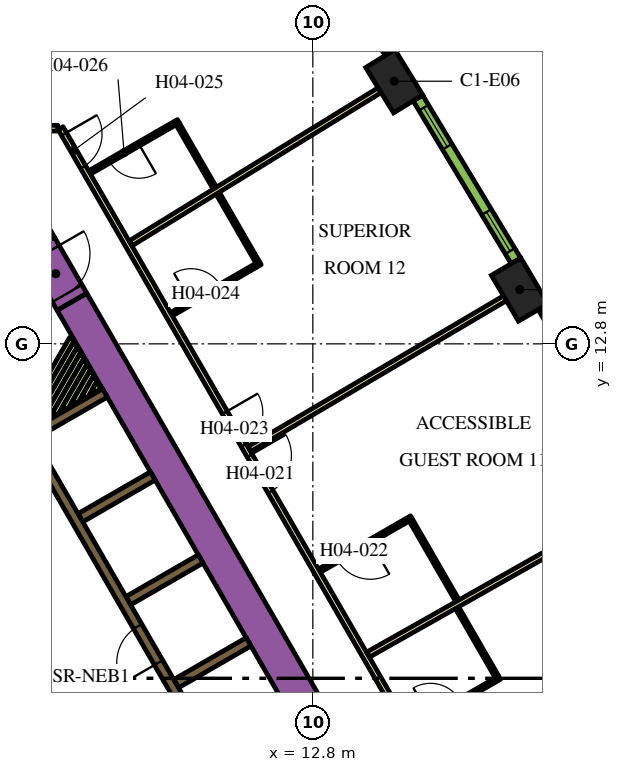
"""IFC4 building model, lengths in metres.
Left out: names, types, materials, properties, quantities, classifications, styles, units other than length and angle.
Written with IfcOpenShell. Run it as: python <this file> out.ifc"""

import sys

from ifc_helpers import new_model, si_unit, direction, frame, frame_2d, origin, origin_2d, place, context, subcontext, project, spatial, rectangle, extrude, element, fill, save


model = new_model("IFC4")
c1 = context("Model", 3, precision=1e-05, world=origin(), true_north=direction((0.0, 1.0)))
c2 = subcontext(c1, "Body", "Model", "MODEL_VIEW")
j1 = project(units=[si_unit("LENGTHUNIT", "METRE"), si_unit("PLANEANGLEUNIT", "RADIAN")], contexts=[c1])
p1 = place(None, origin())
s1 = spatial("IfcSite", under=j1, at=p1, CompositionType="ELEMENT")
p2 = place(p1, origin())
s2 = spatial("IfcBuilding", under=s1, at=p2, CompositionType="ELEMENT")
p3 = place(p2, frame((0.0, 0.0, 70.5)))
s3 = spatial("IfcBuildingStorey", under=s2, at=p3, CompositionType="ELEMENT", Elevation=70.5)
for number, where, z_axis, x_axis in (
    (1, (18.243, 14.228, 0.0), (0.0, 0.0, 1.0), (-0.508, 0.861, 0.0)),
    (2, (14.942, 19.71, 0.0), (0.0, 0.0, 1.0), (-0.524, 0.852, 0.0)),
):
    element("IfcColumn", number, at=place(p3, frame(where, z_axis=z_axis, x_axis=x_axis)), inside=s3, PredefinedType="COLUMN", context=c2, shape_type="SweptSolid", body=[
        extrude(rectangle(XDim=1.4, YDim=0.9, at=origin_2d()), origin(), (0.0, 0.0, 1.0), 3.9),
    ])
p4 = place(p3, frame((6.461, 13.909, 0.0), z_axis=(0.0, 0.0, 1.0), x_axis=(0.500005804227, -0.866022052686, 0.0)))
e3 = element("IfcWall", 3, at=p4, inside=s3, PredefinedType="SOLIDWALL", context=c2, shape_type="SweptSolid", body=[
    extrude(rectangle(XDim=20.834, YDim=0.9, at=frame_2d((10.417, 0.0))), origin(), (0.0, 0.0, 1.0), 3.9),
])
p5 = place(p3, frame((5.611, 15.382, 0.0), z_axis=(0.0, 0.0, 1.0), x_axis=(-0.500102178127, 0.865966403178, 0.0)))
e4 = element("IfcWall", 4, at=p5, inside=s3, PredefinedType="SOLIDWALL", context=c2, shape_type="SweptSolid", body=[
    extrude(rectangle(XDim=0.464, YDim=0.9, at=frame_2d((0.232, 0.0))), origin(), (0.0, 0.0, 1.0), 3.9),
])
for number, where, z_axis, x_axis in (
    (5, (9.204, 3.859, 0.0), (0.0, 0.0, 1.0), (0.866, 0.5, 0.0)),
    (6, (7.944, 6.041, 0.0), (0.0, 0.0, 1.0), (0.866, 0.5, 0.0)),
    (7, (6.684, 8.224, 0.0), (0.0, 0.0, 1.0), (0.866, 0.5, 0.0)),
):
    element("IfcWall", number, at=place(p3, frame(where, z_axis=z_axis, x_axis=x_axis)), inside=s3, PredefinedType="SOLIDWALL", context=c2, shape_type="SweptSolid", body=[
        extrude(rectangle(XDim=2.2, YDim=0.25, at=frame_2d((1.1, 0.0))), origin(), (0.0, 0.0, 1.0), 3.9),
    ])
p6 = place(p3, frame((4.776, 10.032, 0.0), z_axis=(0.0, 0.0, 1.0), x_axis=(0.86600215702, 0.500040262416, 0.0)))
e8 = element("IfcWall", 8, at=p6, inside=s3, PredefinedType="SOLIDWALL", context=c2, shape_type="SweptSolid", body=[
    extrude(rectangle(XDim=2.948, YDim=0.25, at=frame_2d((1.474, 0.0))), origin(), (0.0, 0.0, 1.0), 3.9),
])
p7 = place(p3, frame((5.97, -2.591, 0.0), z_axis=(0.0, 0.0, 1.0), x_axis=(-0.499994469932, 0.866028596547, 0.0)))
e9 = element("IfcWall", 9, at=p7, inside=s3, PredefinedType="SOLIDWALL", context=c2, shape_type="SweptSolid", body=[
    extrude(rectangle(XDim=10.488, YDim=0.25, at=frame_2d((5.244, 0.0))), origin(), (0.0, 0.0, 1.0), 3.9),
])
p8 = place(p3, frame((4.982, 10.359, 0.0), z_axis=(0.0, 0.0, 1.0), x_axis=(0.500051824031, 0.865995481099, 0.0)))
e10 = element("IfcWall", 10, at=p8, inside=s3, PredefinedType="PARTITIONING", context=c2, shape_type="SweptSolid", body=[
    extrude(rectangle(XDim=2.973, YDim=0.15, at=frame_2d((1.486, 0.0))), origin(), (0.0, 0.0, 1.0), 2.75),
])
p9 = place(p3, frame((5.242, 10.509, 0.0), z_axis=(0.0, 0.0, 1.0), x_axis=(0.499958506883, 0.866049358521, 0.0)))
e11 = element("IfcWall", 11, at=p9, inside=s3, PredefinedType="PARTITIONING", context=c2, shape_type="SweptSolid", body=[
    extrude(rectangle(XDim=2.626, YDim=0.15, at=frame_2d((1.313, 0.0))), origin(), (0.0, 0.0, 1.0), 2.75),
])
p10 = place(p3, frame((5.501, 10.659, 0.0), z_axis=(0.0, 0.0, 1.0), x_axis=(0.499951092774, 0.866053638543, 0.0)))
e12 = element("IfcWall", 12, at=p10, inside=s3, PredefinedType="PARTITIONING", context=c2, shape_type="SweptSolid", body=[
    extrude(rectangle(XDim=2.28, YDim=0.15, at=frame_2d((1.14, 0.0))), origin(), (0.0, 0.0, 1.0), 2.75),
])
p11 = place(p3, frame((5.761, 10.809, 0.0), z_axis=(0.0, 0.0, 1.0), x_axis=(0.499900985997, 0.866082561999, 0.0)))
e13 = element("IfcWall", 13, at=p11, inside=s3, PredefinedType="PARTITIONING", context=c2, shape_type="SweptSolid", body=[
    extrude(rectangle(XDim=1.934, YDim=0.15, at=frame_2d((0.967, 0.0))), origin(), (0.0, 0.0, 1.0), 2.75),
])
p12 = place(p3, frame((6.021, 10.959, 0.0), z_axis=(0.0, 0.0, 1.0), x_axis=(0.499944387978, 0.86605750902, 0.0)))
e14 = element("IfcWall", 14, at=p12, inside=s3, PredefinedType="PARTITIONING", context=c2, shape_type="SweptSolid", body=[
    extrude(rectangle(XDim=1.587, YDim=0.15, at=frame_2d((0.793, 0.0))), origin(), (0.0, 0.0, 1.0), 2.75),
])
p13 = place(p3, frame((6.281, 11.109, 0.0), z_axis=(0.0, 0.0, 1.0), x_axis=(0.500012022864, 0.866018462269, 0.0)))
e15 = element("IfcWall", 15, at=p13, inside=s3, PredefinedType="PARTITIONING", context=c2, shape_type="SweptSolid", body=[
    extrude(rectangle(XDim=1.241, YDim=0.15, at=frame_2d((0.62, 0.0))), origin(), (0.0, 0.0, 1.0), 2.75),
])
p14 = place(p3, frame((6.541, 11.259, 0.0), z_axis=(0.0, 0.0, 1.0), x_axis=(0.500132045864, 0.865949153646, 0.0)))
e16 = element("IfcWall", 16, at=p14, inside=s3, PredefinedType="PARTITIONING", context=c2, shape_type="SweptSolid", body=[
    extrude(rectangle(XDim=0.894, YDim=0.15, at=frame_2d((0.447, 0.0))), origin(), (0.0, 0.0, 1.0), 2.75),
])
p15 = place(p3, frame((6.8, 11.409, 0.0), z_axis=(0.0, 0.0, 1.0), x_axis=(0.500210807569, 0.865903659763, 0.0)))
e17 = element("IfcWall", 17, at=p15, inside=s3, PredefinedType="PARTITIONING", context=c2, shape_type="SweptSolid", body=[
    extrude(rectangle(XDim=0.548, YDim=0.15, at=frame_2d((0.274, 0.0))), origin(), (0.0, 0.0, 1.0), 2.75),
])
p16 = place(p3, frame((7.06, 11.559, 0.0), z_axis=(0.0, 0.0, 1.0), x_axis=(0.499267785915, 0.866447735266, 0.0)))
e18 = element("IfcWall", 18, at=p16, inside=s3, PredefinedType="PARTITIONING", context=c2, shape_type="SweptSolid", body=[
    extrude(rectangle(XDim=0.201, YDim=0.15, at=frame_2d((0.101, 0.0))), origin(), (0.0, 0.0, 1.0), 2.75),
])
p17 = place(p3, frame((11.553, -0.46, 0.0), z_axis=(0.0, 0.0, 1.0), x_axis=(-0.500006514828, 0.866021642414, 0.0)))
e19 = element("IfcWall", 19, at=p17, inside=s3, PredefinedType="SOLIDWALL", context=c2, shape_type="SweptSolid", body=[
    extrude(rectangle(XDim=12.35, YDim=0.25, at=frame_2d((6.175, 0.0))), origin(), (0.0, 0.0, 1.0), 3.9),
])
p18 = place(p17, frame((0.585, 0.0, 0.0)))
e20 = element("IfcOpeningElement", 20, at=p18, cuts=e19, PredefinedType="OPENING", context=c2, shape_type="SweptSolid", body=[
    extrude(rectangle(XDim=1.1, YDim=2.1, at=frame_2d((0.55, 1.05))), frame((0.0, 0.135, 0.0), z_axis=(0.0, -1.0, 0.0), x_axis=(1.0, 0.0, 0.0)), (0.0, 0.0, 1.0), 0.27),
])
p19 = place(p17, frame((3.105, 0.0, 0.0)))
e21 = element("IfcOpeningElement", 21, at=p19, cuts=e19, PredefinedType="OPENING", context=c2, shape_type="SweptSolid", body=[
    extrude(rectangle(XDim=1.1, YDim=2.1, at=frame_2d((0.55, 1.05))), frame((0.0, 0.135, 0.0), z_axis=(0.0, -1.0, 0.0), x_axis=(1.0, 0.0, 0.0)), (0.0, 0.0, 1.0), 0.27),
])
p20 = place(p17, frame((5.625, 0.0, 0.0)))
e22 = element("IfcOpeningElement", 22, at=p20, cuts=e19, PredefinedType="OPENING", context=c2, shape_type="SweptSolid", body=[
    extrude(rectangle(XDim=1.1, YDim=2.1, at=frame_2d((0.55, 1.05))), frame((0.0, 0.135, 0.0), z_axis=(0.0, -1.0, 0.0), x_axis=(1.0, 0.0, 0.0)), (0.0, 0.0, 1.0), 0.27),
])
p21 = place(p3, frame((8.565, -2.185, 0.0), z_axis=(0.0, 0.0, 1.0), x_axis=(-0.499997954832, 0.866026584559, 0.0)))
e23 = element("IfcWall", 23, at=p21, inside=s3, PredefinedType="SOLIDWALL", context=c2, shape_type="SweptSolid", body=[
    extrude(rectangle(XDim=12.35, YDim=0.25, at=frame_2d((6.175, 0.0))), origin(), (0.0, 0.0, 1.0), 3.9),
])
p22 = place(p21, frame((5.725, 0.0, 0.0)))
e24 = element("IfcOpeningElement", 24, at=p22, cuts=e23, PredefinedType="OPENING", context=c2, shape_type="SweptSolid", body=[
    extrude(rectangle(XDim=0.9, YDim=2.1, at=frame_2d((0.45, 1.05))), frame((0.0, 0.135, 0.0), z_axis=(0.0, -1.0, 0.0), x_axis=(1.0, 0.0, 0.0)), (0.0, 0.0, 1.0), 0.27),
])
p23 = place(p3, frame((5.611, 15.382, 0.0), z_axis=(0.0, 0.0, 1.0), x_axis=(0.500062241894, -0.865989465428, 0.0)))
e25 = element("IfcWall", 25, at=p23, inside=s3, PredefinedType="SOLIDWALL", context=c2, shape_type="SweptSolid", body=[
    extrude(rectangle(XDim=1.7, YDim=0.9, at=frame_2d((0.85, 0.0))), origin(), (0.0, 0.0, 1.0), 3.9),
])
p24 = place(p23, frame((0.25, 0.0, 0.0)))
e26 = element("IfcOpeningElement", 26, at=p24, cuts=e25, PredefinedType="OPENING", context=c2, shape_type="SweptSolid", body=[
    extrude(rectangle(XDim=1.2, YDim=2.1, at=frame_2d((0.6, 1.05))), frame((0.0, 0.46, 0.0), z_axis=(0.0, -1.0, 0.0), x_axis=(1.0, 0.0, 0.0)), (0.0, 0.0, 1.0), 0.92),
])
p25 = place(p3, frame((6.163, 18.475, 0.0), z_axis=(0.0, 0.0, 1.0), x_axis=(0.500001317485, -0.866024643133, 0.0)))
e27 = element("IfcWall", 27, at=p25, inside=s3, PredefinedType="PARTITIONING", context=c2, shape_type="SweptSolid", body=[
    extrude(rectangle(XDim=25.767, YDim=0.15, at=frame_2d((12.883, 0.0))), origin(), (0.0, 0.0, 1.0), 2.75),
])
p26 = place(p25, frame((21.138, 0.0, 0.0)))
e28 = element("IfcOpeningElement", 28, at=p26, cuts=e27, PredefinedType="OPENING", context=c2, shape_type="SweptSolid", body=[
    extrude(rectangle(XDim=1.0, YDim=2.1, at=frame_2d((0.5, 1.05))), frame((0.0, 0.085, 0.0), z_axis=(0.0, -1.0, 0.0), x_axis=(1.0, 0.0, 0.0)), (0.0, 0.0, 1.0), 0.17),
])
p27 = place(p25, frame((9.948, 0.0, 0.0)))
e29 = element("IfcOpeningElement", 29, at=p27, cuts=e27, PredefinedType="OPENING", context=c2, shape_type="SweptSolid", body=[
    extrude(rectangle(XDim=1.1, YDim=2.1, at=frame_2d((0.55, 1.05))), frame((0.0, 0.085, 0.0), z_axis=(0.0, -1.0, 0.0), x_axis=(1.0, 0.0, 0.0)), (0.0, 0.0, 1.0), 0.17),
])
p28 = place(p25, frame((8.641, 0.0, 0.0)))
e30 = element("IfcOpeningElement", 30, at=p28, cuts=e27, PredefinedType="OPENING", context=c2, shape_type="SweptSolid", body=[
    extrude(rectangle(XDim=1.0, YDim=2.1, at=frame_2d((0.5, 1.05))), frame((0.0, 0.085, 0.0), z_axis=(0.0, -1.0, 0.0), x_axis=(1.0, 0.0, 0.0)), (0.0, 0.0, 1.0), 0.17),
])
p29 = place(p25, frame((0.18, 0.0, 0.0)))
e31 = element("IfcOpeningElement", 31, at=p29, cuts=e27, PredefinedType="OPENING", context=c2, shape_type="SweptSolid", body=[
    extrude(rectangle(XDim=1.0, YDim=2.1, at=frame_2d((0.5, 1.05))), frame((0.0, 0.085, 0.0), z_axis=(0.0, -1.0, 0.0), x_axis=(1.0, 0.0, 0.0)), (0.0, 0.0, 1.0), 0.17),
])
p30 = place(p3, frame((0.825, 18.475, 0.0), z_axis=(0.0, 0.0, 1.0), x_axis=(1.0, 0.0, 0.0)))
e32 = element("IfcWall", 32, at=p30, inside=s3, PredefinedType="PARTITIONING", context=c2, shape_type="SweptSolid", body=[
    extrude(rectangle(XDim=5.268, YDim=0.15, at=frame_2d((2.634, 0.0))), origin(), (0.0, 0.0, 1.0), 2.75),
])
p31 = place(p3, frame((11.16, 24.888, 0.0), z_axis=(0.0, 0.0, 1.0), x_axis=(-0.84199813156, -0.539480441211, 0.0)))
e33 = element("IfcWall", 33, at=p31, inside=s3, PredefinedType="PARTITIONING", context=c2, shape_type="SweptSolid", body=[
    extrude(rectangle(XDim=11.638, YDim=0.15, at=frame_2d((5.819, 0.0))), origin(), (0.0, 0.0, 1.0), 2.75),
])
p32 = place(p3, frame((14.558, 19.475, 0.0), z_axis=(0.0, 0.0, 1.0), x_axis=(-0.851829455142, -0.523819223925, 0.0)))
e34 = element("IfcWall", 34, at=p32, inside=s3, PredefinedType="PARTITIONING", context=c2, shape_type="SweptSolid", body=[
    extrude(rectangle(XDim=7.688, YDim=0.15, at=frame_2d((3.844, 0.0))), origin(), (0.0, 0.0, 1.0), 2.75),
])
p33 = place(p3, frame((17.856, 13.999, 0.0), z_axis=(0.0, 0.0, 1.0), x_axis=(-0.861371519381, -0.507975497047, 0.0)))
e35 = element("IfcWall", 35, at=p33, inside=s3, PredefinedType="PARTITIONING", context=c2, shape_type="SweptSolid", body=[
    extrude(rectangle(XDim=7.804, YDim=0.15, at=frame_2d((3.902, 0.0))), origin(), (0.0, 0.0, 1.0), 2.75),
])
p34 = place(p3, frame((21.052, 8.464, 0.0), z_axis=(0.0, 0.0, 1.0), x_axis=(-0.87059371954, -0.492002617368, 0.0)))
e36 = element("IfcWall", 36, at=p34, inside=s3, PredefinedType="PARTITIONING", context=c2, shape_type="SweptSolid", body=[
    extrude(rectangle(XDim=7.803, YDim=0.15, at=frame_2d((3.902, 0.0))), origin(), (0.0, 0.0, 1.0), 2.75),
])
p35 = place(p3, frame((15.376, 2.668, 0.0), z_axis=(0.0, 0.0, 1.0), x_axis=(0.866036505625, 0.499980770555, 0.0)))
e37 = element("IfcWall", 37, at=p35, inside=s3, PredefinedType="PARTITIONING", context=c2, shape_type="SweptSolid", body=[
    extrude(rectangle(XDim=2.7, YDim=0.1, at=frame_2d((1.35, 0.0))), origin(), (0.0, 0.0, 1.0), 2.75),
])
p36 = place(p35, frame((0.6, 0.0, 0.0)))
e38 = element("IfcOpeningElement", 38, at=p36, cuts=e37, PredefinedType="OPENING", context=c2, shape_type="SweptSolid", body=[
    extrude(rectangle(XDim=0.9, YDim=2.1, at=frame_2d((0.45, 1.05))), frame((0.0, 0.06, 0.0), z_axis=(0.0, -1.0, 0.0), x_axis=(1.0, 0.0, 0.0)), (0.0, 0.0, 1.0), 0.12),
])
p37 = place(p3, frame((17.646, 4.036, 0.0), z_axis=(0.0, 0.0, 1.0), x_axis=(-0.500027713859, 0.866009402589, 0.0)))
e39 = element("IfcWall", 39, at=p37, inside=s3, PredefinedType="PARTITIONING", context=c2, shape_type="SweptSolid", body=[
    extrude(rectangle(XDim=2.1, YDim=0.1, at=frame_2d((1.05, 0.0))), origin(), (0.0, 0.0, 1.0), 2.75),
])
p38 = place(p3, frame((15.397, 8.231, 0.0), z_axis=(0.0, 0.0, 1.0), x_axis=(-0.866018616679, -0.500011755427, 0.0)))
e40 = element("IfcWall", 40, at=p38, inside=s3, PredefinedType="PARTITIONING", context=c2, shape_type="SweptSolid", body=[
    extrude(rectangle(XDim=2.8, YDim=0.1, at=frame_2d((1.4, 0.0))), origin(), (0.0, 0.0, 1.0), 2.75),
])
p39 = place(p38, frame((1.25, 0.0, 0.0)))
e41 = element("IfcOpeningElement", 41, at=p39, cuts=e40, PredefinedType="OPENING", context=c2, shape_type="SweptSolid", body=[
    extrude(rectangle(XDim=1.0, YDim=2.1, at=frame_2d((0.5, 1.05))), frame((0.0, 0.06, 0.0), z_axis=(0.0, -1.0, 0.0), x_axis=(1.0, 0.0, 0.0)), (0.0, 0.0, 1.0), 0.12),
])
p40 = place(p3, frame((15.379, 8.163, 0.0), z_axis=(0.0, 0.0, 1.0), x_axis=(0.499987006516, -0.866032905446, 0.0)))
e42 = element("IfcWall", 42, at=p40, inside=s3, PredefinedType="PARTITIONING", context=c2, shape_type="SweptSolid", body=[
    extrude(rectangle(XDim=2.45, YDim=0.1, at=frame_2d((1.225, 0.0))), origin(), (0.0, 0.0, 1.0), 2.75),
])
p41 = place(p3, frame((9.077, 13.578, 0.0), z_axis=(0.0, 0.0, 1.0), x_axis=(0.866036505625, 0.499980770555, 0.0)))
e43 = element("IfcWall", 43, at=p41, inside=s3, PredefinedType="PARTITIONING", context=c2, shape_type="SweptSolid", body=[
    extrude(rectangle(XDim=2.7, YDim=0.1, at=frame_2d((1.35, 0.0))), origin(), (0.0, 0.0, 1.0), 2.75),
])
p42 = place(p41, frame((0.6, 0.0, 0.0)))
e44 = element("IfcOpeningElement", 44, at=p42, cuts=e43, PredefinedType="OPENING", context=c2, shape_type="SweptSolid", body=[
    extrude(rectangle(XDim=0.9, YDim=2.1, at=frame_2d((0.45, 1.05))), frame((0.0, 0.06, 0.0), z_axis=(0.0, -1.0, 0.0), x_axis=(1.0, 0.0, 0.0)), (0.0, 0.0, 1.0), 0.12),
])
p43 = place(p3, frame((11.342, 14.955, 0.0), z_axis=(0.0, 0.0, 1.0), x_axis=(-0.500008976872, 0.866020220923, 0.0)))
e45 = element("IfcWall", 45, at=p43, inside=s3, PredefinedType="PARTITIONING", context=c2, shape_type="SweptSolid", body=[
    extrude(rectangle(XDim=2.09, YDim=0.1, at=frame_2d((1.045, 0.0))), origin(), (0.0, 0.0, 1.0), 2.75),
])
p44 = place(p3, frame((9.262, 18.658, 0.0), z_axis=(0.0, 0.0, 1.0), x_axis=(-0.866019956843, -0.50000943426, 0.0)))
e46 = element("IfcWall", 46, at=p44, inside=s3, PredefinedType="PARTITIONING", context=c2, shape_type="SweptSolid", body=[
    extrude(rectangle(XDim=2.7, YDim=0.1, at=frame_2d((1.35, 0.0))), origin(), (0.0, 0.0, 1.0), 2.75),
])
p45 = place(p44, frame((1.2, 0.0, 0.0)))
e47 = element("IfcOpeningElement", 47, at=p45, cuts=e46, PredefinedType="OPENING", context=c2, shape_type="SweptSolid", body=[
    extrude(rectangle(XDim=0.9, YDim=2.1, at=frame_2d((0.45, 1.05))), frame((0.0, 0.06, 0.0), z_axis=(0.0, -1.0, 0.0), x_axis=(1.0, 0.0, 0.0)), (0.0, 0.0, 1.0), 0.12),
])
p46 = place(p3, frame((9.244, 18.589, 0.0), z_axis=(0.0, 0.0, 1.0), x_axis=(0.500043961785, -0.866000020948, 0.0)))
e48 = element("IfcWall", 48, at=p46, inside=s3, PredefinedType="PARTITIONING", context=c2, shape_type="SweptSolid", body=[
    extrude(rectangle(XDim=1.95, YDim=0.1, at=frame_2d((0.975, 0.0))), origin(), (0.0, 0.0, 1.0), 2.75),
])
p47 = place(p3, frame((21.357, 9.445, 0.0), z_axis=(0.0, 0.0, 1.0), x_axis=(-0.50002123722, 0.866013142123, 0.0)))
e49 = element("IfcWall", 49, at=p47, inside=s3, PredefinedType="SOLIDWALL", context=c2, shape_type="SweptSolid", body=[
    extrude(rectangle(XDim=4.998, YDim=0.29, at=frame_2d((2.499, 0.0))), origin(), (0.0, 0.0, 1.0), 3.65),
])
p48 = place(p47, frame((0.297, 0.0, 0.9)))
e50 = element("IfcOpeningElement", 50, at=p48, cuts=e49, PredefinedType="OPENING", context=c2, shape_type="SweptSolid", body=[
    extrude(rectangle(XDim=1.2, YDim=2.15, at=frame_2d((0.6, 1.075))), frame((0.0, 0.155, 0.0), z_axis=(0.0, -1.0, 0.0), x_axis=(1.0, 0.0, 0.0)), (0.0, 0.0, 1.0), 0.31),
])
p49 = place(p47, frame((3.501, 0.0, 0.9)))
e51 = element("IfcOpeningElement", 51, at=p49, cuts=e49, PredefinedType="OPENING", context=c2, shape_type="SweptSolid", body=[
    extrude(rectangle(XDim=1.2, YDim=2.15, at=frame_2d((0.6, 1.075))), frame((0.0, 0.155, 0.0), z_axis=(0.0, -1.0, 0.0), x_axis=(1.0, 0.0, 0.0)), (0.0, 0.0, 1.0), 0.31),
])
p50 = place(p3, frame((18.143, 14.986, 0.0), z_axis=(0.0, 0.0, 1.0), x_axis=(-0.515938796285, 0.856625448191, 0.0)))
e52 = element("IfcWall", 52, at=p50, inside=s3, PredefinedType="SOLIDWALL", context=c2, shape_type="SweptSolid", body=[
    extrude(rectangle(XDim=4.998, YDim=0.29, at=frame_2d((2.499, 0.0))), origin(), (0.0, 0.0, 1.0), 3.65),
])
p51 = place(p50, frame((0.297, 0.0, 0.9)))
e53 = element("IfcOpeningElement", 53, at=p51, cuts=e52, PredefinedType="OPENING", context=c2, shape_type="SweptSolid", body=[
    extrude(rectangle(XDim=1.2, YDim=2.15, at=frame_2d((0.6, 1.075))), frame((0.0, 0.155, 0.0), z_axis=(0.0, -1.0, 0.0), x_axis=(1.0, 0.0, 0.0)), (0.0, 0.0, 1.0), 0.31),
])
p52 = place(p50, frame((3.501, 0.0, 0.9)))
e54 = element("IfcOpeningElement", 54, at=p52, cuts=e52, PredefinedType="OPENING", context=c2, shape_type="SweptSolid", body=[
    extrude(rectangle(XDim=1.2, YDim=2.15, at=frame_2d((0.6, 1.075))), frame((0.0, 0.155, 0.0), z_axis=(0.0, -1.0, 0.0), x_axis=(1.0, 0.0, 0.0)), (0.0, 0.0, 1.0), 0.31),
])
p53 = place(p3, frame((14.827, 20.466, 0.0), z_axis=(0.0, 0.0, 1.0), x_axis=(-0.531688286542, 0.846940119462, 0.0)))
e55 = element("IfcWall", 55, at=p53, inside=s3, PredefinedType="SOLIDWALL", context=c2, shape_type="SweptSolid", body=[
    extrude(rectangle(XDim=4.998, YDim=0.29, at=frame_2d((2.499, 0.0))), origin(), (0.0, 0.0, 1.0), 3.65),
])
p54 = place(p53, frame((0.297, 0.0, 0.9)))
e56 = element("IfcOpeningElement", 56, at=p54, cuts=e55, PredefinedType="OPENING", context=c2, shape_type="SweptSolid", body=[
    extrude(rectangle(XDim=1.2, YDim=2.15, at=frame_2d((0.6, 1.075))), frame((0.0, 0.155, 0.0), z_axis=(0.0, -1.0, 0.0), x_axis=(1.0, 0.0, 0.0)), (0.0, 0.0, 1.0), 0.31),
])
p55 = place(p53, frame((3.501, 0.0, 0.9)))
e57 = element("IfcOpeningElement", 57, at=p55, cuts=e55, PredefinedType="OPENING", context=c2, shape_type="SweptSolid", body=[
    extrude(rectangle(XDim=1.2, YDim=2.15, at=frame_2d((0.6, 1.075))), frame((0.0, 0.155, 0.0), z_axis=(0.0, -1.0, 0.0), x_axis=(1.0, 0.0, 0.0)), (0.0, 0.0, 1.0), 0.31),
])
p56 = place(p20, origin())
e58 = element("IfcDoor", 58, at=p56, inside=s3, OperationType="DOUBLE_DOOR_SLIDING", PredefinedType="DOOR", context=c2, shape_type="SweptSolid", body=[
    extrude(rectangle(XDim=1.1, YDim=2.1, at=frame_2d((0.55, 1.05))), frame((0.0, 0.025, 0.0), z_axis=(0.0, -1.0, 0.0), x_axis=(1.0, 0.0, 0.0)), (0.0, 0.0, 1.0), 0.05),
])
fill(e22, e58)
p57 = place(p24, origin())
e59 = element("IfcDoor", 59, at=p57, inside=s3, OperationType="SINGLE_SWING_LEFT", PredefinedType="DOOR", context=c2, shape_type="SweptSolid", body=[
    extrude(rectangle(XDim=1.2, YDim=2.1, at=frame_2d((0.6, 1.05))), frame((0.0, 0.025, 0.0), z_axis=(0.0, -1.0, 0.0), x_axis=(1.0, 0.0, 0.0)), (0.0, 0.0, 1.0), 0.05),
])
fill(e26, e59)
p58 = place(p27, origin())
e60 = element("IfcDoor", 60, at=p58, inside=s3, OperationType="SINGLE_SWING_LEFT", PredefinedType="DOOR", context=c2, shape_type="SweptSolid", body=[
    extrude(rectangle(XDim=1.1, YDim=2.1, at=frame_2d((0.55, 1.05))), frame((0.0, 0.025, 0.0), z_axis=(0.0, -1.0, 0.0), x_axis=(1.0, 0.0, 0.0)), (0.0, 0.0, 1.0), 0.05),
])
fill(e29, e60)
p59 = place(p39, origin())
e61 = element("IfcDoor", 61, at=p59, inside=s3, OperationType="SINGLE_SWING_LEFT", PredefinedType="DOOR", context=c2, shape_type="SweptSolid", body=[
    extrude(rectangle(XDim=1.0, YDim=2.1, at=frame_2d((0.5, 1.05))), frame((0.0, 0.025, 0.0), z_axis=(0.0, -1.0, 0.0), x_axis=(1.0, 0.0, 0.0)), (0.0, 0.0, 1.0), 0.05),
])
fill(e41, e61)
p60 = place(p28, origin())
e62 = element("IfcDoor", 62, at=p60, inside=s3, OperationType="SINGLE_SWING_RIGHT", PredefinedType="DOOR", context=c2, shape_type="SweptSolid", body=[
    extrude(rectangle(XDim=1.0, YDim=2.1, at=frame_2d((0.5, 1.05))), frame((0.0, 0.025, 0.0), z_axis=(0.0, -1.0, 0.0), x_axis=(1.0, 0.0, 0.0)), (0.0, 0.0, 1.0), 0.05),
])
fill(e30, e62)
p61 = place(p42, origin())
e63 = element("IfcDoor", 63, at=p61, inside=s3, OperationType="SINGLE_SWING_RIGHT", PredefinedType="DOOR", context=c2, shape_type="SweptSolid", body=[
    extrude(rectangle(XDim=0.9, YDim=2.1, at=frame_2d((0.45, 1.05))), frame((0.0, 0.025, 0.0), z_axis=(0.0, -1.0, 0.0), x_axis=(1.0, 0.0, 0.0)), (0.0, 0.0, 1.0), 0.05),
])
fill(e44, e63)
p62 = place(p29, origin())
e64 = element("IfcDoor", 64, at=p62, inside=s3, OperationType="SINGLE_SWING_LEFT", PredefinedType="DOOR", context=c2, shape_type="SweptSolid", body=[
    extrude(rectangle(XDim=1.0, YDim=2.1, at=frame_2d((0.5, 1.05))), frame((0.0, 0.025, 0.0), z_axis=(0.0, -1.0, 0.0), x_axis=(1.0, 0.0, 0.0)), (0.0, 0.0, 1.0), 0.05),
])
fill(e31, e64)
p63 = place(p45, origin())
e65 = element("IfcDoor", 65, at=p63, inside=s3, OperationType="SINGLE_SWING_LEFT", PredefinedType="DOOR", context=c2, shape_type="SweptSolid", body=[
    extrude(rectangle(XDim=0.9, YDim=2.1, at=frame_2d((0.45, 1.05))), frame((0.0, 0.025, 0.0), z_axis=(0.0, -1.0, 0.0), x_axis=(1.0, 0.0, 0.0)), (0.0, 0.0, 1.0), 0.05),
])
fill(e47, e65)
p64 = place(p51, origin())
e66 = element("IfcWindow", 66, at=p64, inside=s3, PartitioningType="DOUBLE_PANEL_VERTICAL", PredefinedType="WINDOW", context=c2, shape_type="SweptSolid", body=[
    extrude(rectangle(XDim=1.2, YDim=2.15, at=frame_2d((0.6, 1.075))), frame((0.0, 0.015, 0.0), z_axis=(0.0, -1.0, 0.0), x_axis=(1.0, 0.0, 0.0)), (0.0, 0.0, 1.0), 0.06),
])
fill(e53, e66)
p65 = place(p52, origin())
e67 = element("IfcWindow", 67, at=p65, inside=s3, PartitioningType="DOUBLE_PANEL_VERTICAL", PredefinedType="WINDOW", context=c2, shape_type="SweptSolid", body=[
    extrude(rectangle(XDim=1.2, YDim=2.15, at=frame_2d((0.6, 1.075))), frame((0.0, 0.015, 0.0), z_axis=(0.0, -1.0, 0.0), x_axis=(1.0, 0.0, 0.0)), (0.0, 0.0, 1.0), 0.06),
])
fill(e54, e67)
save(model, sys.argv[1])
